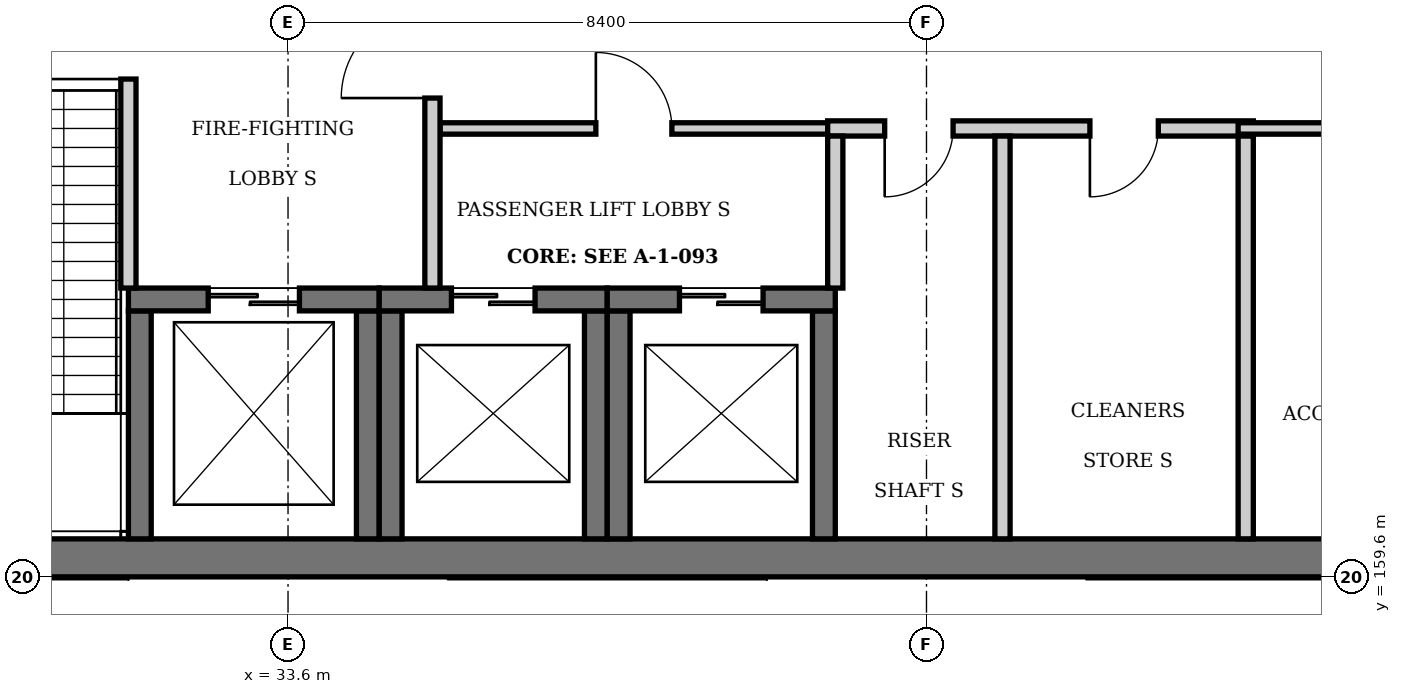
"""IFC4 building model, lengths in metres.
Left out: names, types, materials, properties, quantities, classifications, styles, units other than length and angle.
Written with IfcOpenShell. Run it as: python <this file> out.ifc"""

import sys

from ifc_helpers import new_model, si_unit, direction, frame, frame_2d, origin, place, context, subcontext, project, spatial, rectangle, extrude, element, fill, save


model = new_model("IFC4")
c1 = context("Model", 3, precision=1e-05, world=origin(), true_north=direction((0.0, 1.0)))
c2 = subcontext(c1, "Body", "Model", "MODEL_VIEW")
j1 = project(units=[si_unit("LENGTHUNIT", "METRE"), si_unit("PLANEANGLEUNIT", "RADIAN")], contexts=[c1])
p1 = place(None, origin())
s1 = spatial("IfcSite", under=j1, at=p1, CompositionType="ELEMENT")
p2 = place(p1, origin())
s2 = spatial("IfcBuilding", under=s1, at=p2, CompositionType="ELEMENT")
p3 = place(p2, frame((0.0, 0.0, 10.8)))
s3 = spatial("IfcBuildingStorey", under=s2, at=p3, CompositionType="ELEMENT", Elevation=10.8)
p4 = place(p3, frame((25.35, 159.85, 0.0), z_axis=(0.0, 0.0, 1.0), x_axis=(1.0, 0.0, 0.0)))
e1 = element("IfcWall", 1, at=p4, inside=s3, PredefinedType="SHEAR", context=c2, shape_type="SweptSolid", body=[
    extrude(rectangle(XDim=25.043, YDim=0.5, at=frame_2d((12.521, 0.0))), origin(), (0.0, 0.0, 1.0), 6.3),
])
for number, where, z_axis, x_axis in (
    (2, (34.65, 160.1, 0.0), (0.0, 0.0, 1.0), (0.0, 1.0, 0.0)),
    (3, (31.65, 160.1, 0.0), (0.0, 0.0, 1.0), (0.0, 1.0, 0.0)),
):
    element("IfcWall", number, at=place(p3, frame(where, z_axis=z_axis, x_axis=x_axis)), inside=s3, PredefinedType="SHEAR", context=c2, shape_type="SweptSolid", body=[
        extrude(rectangle(XDim=3.0, YDim=0.3, at=frame_2d((1.5, 0.0))), origin(), (0.0, 0.0, 1.0), 6.3),
    ])
p5 = place(p3, frame((31.5, 163.25, 0.0), z_axis=(0.0, 0.0, 1.0), x_axis=(1.0, 0.0, 0.0)))
e4 = element("IfcWall", 4, at=p5, inside=s3, PredefinedType="SHEAR", context=c2, shape_type="SweptSolid", body=[
    extrude(rectangle(XDim=3.3, YDim=0.3, at=frame_2d((1.65, 0.0))), origin(), (0.0, 0.0, 1.0), 6.3),
])
p6 = place(p5, frame((1.05, 0.0, 0.0)))
e5 = element("IfcOpeningElement", 5, at=p6, cuts=e4, PredefinedType="OPENING", context=c2, shape_type="SweptSolid", body=[
    extrude(rectangle(XDim=1.2, YDim=2.1, at=frame_2d((0.6, 1.05))), frame((0.0, 0.16, 0.0), z_axis=(0.0, -1.0, 0.0), x_axis=(1.0, 0.0, 0.0)), (0.0, 0.0, 1.0), 0.32),
])
for number, where, z_axis, x_axis in (
    (6, (37.65, 160.1, 0.0), (0.0, 0.0, 1.0), (0.0, 1.0, 0.0)),
    (7, (34.95, 160.1, 0.0), (0.0, 0.0, 1.0), (0.0, 1.0, 0.0)),
):
    element("IfcWall", number, at=place(p3, frame(where, z_axis=z_axis, x_axis=x_axis)), inside=s3, PredefinedType="SHEAR", context=c2, shape_type="SweptSolid", body=[
        extrude(rectangle(XDim=3.0, YDim=0.3, at=frame_2d((1.5, 0.0))), origin(), (0.0, 0.0, 1.0), 6.3),
    ])
p7 = place(p3, frame((34.8, 163.25, 0.0), z_axis=(0.0, 0.0, 1.0), x_axis=(1.0, 0.0, 0.0)))
e8 = element("IfcWall", 8, at=p7, inside=s3, PredefinedType="SHEAR", context=c2, shape_type="SweptSolid", body=[
    extrude(rectangle(XDim=3.0, YDim=0.3, at=frame_2d((1.5, 0.0))), origin(), (0.0, 0.0, 1.0), 6.3),
])
p8 = place(p7, frame((0.95, 0.0, 0.0)))
e9 = element("IfcOpeningElement", 9, at=p8, cuts=e8, PredefinedType="OPENING", context=c2, shape_type="SweptSolid", body=[
    extrude(rectangle(XDim=1.1, YDim=2.1, at=frame_2d((0.55, 1.05))), frame((0.0, 0.16, 0.0), z_axis=(0.0, -1.0, 0.0), x_axis=(1.0, 0.0, 0.0)), (0.0, 0.0, 1.0), 0.32),
])
for number, where, z_axis, x_axis in (
    (10, (40.65, 160.1, 0.0), (0.0, 0.0, 1.0), (0.0, 1.0, 0.0)),
    (11, (37.95, 160.1, 0.0), (0.0, 0.0, 1.0), (0.0, 1.0, 0.0)),
):
    element("IfcWall", number, at=place(p3, frame(where, z_axis=z_axis, x_axis=x_axis)), inside=s3, PredefinedType="SHEAR", context=c2, shape_type="SweptSolid", body=[
        extrude(rectangle(XDim=3.0, YDim=0.3, at=frame_2d((1.5, 0.0))), origin(), (0.0, 0.0, 1.0), 6.3),
    ])
p9 = place(p3, frame((37.8, 163.25, 0.0), z_axis=(0.0, 0.0, 1.0), x_axis=(1.0, 0.0, 0.0)))
e12 = element("IfcWall", 12, at=p9, inside=s3, PredefinedType="SHEAR", context=c2, shape_type="SweptSolid", body=[
    extrude(rectangle(XDim=3.0, YDim=0.3, at=frame_2d((1.5, 0.0))), origin(), (0.0, 0.0, 1.0), 6.3),
])
p10 = place(p9, frame((0.95, 0.0, 0.0)))
e13 = element("IfcOpeningElement", 13, at=p10, cuts=e12, PredefinedType="OPENING", context=c2, shape_type="SweptSolid", body=[
    extrude(rectangle(XDim=1.1, YDim=2.1, at=frame_2d((0.55, 1.05))), frame((0.0, 0.16, 0.0), z_axis=(0.0, -1.0, 0.0), x_axis=(1.0, 0.0, 0.0)), (0.0, 0.0, 1.0), 0.32),
])
p11 = place(p3, frame((35.6, 165.5, 0.0), z_axis=(0.0, 0.0, 1.0), x_axis=(1.0, 0.0, 0.0)))
e14 = element("IfcWall", 14, at=p11, inside=s3, PredefinedType="PARTITIONING", context=c2, shape_type="SweptSolid", body=[
    extrude(rectangle(XDim=5.3, YDim=0.15, at=frame_2d((2.65, 0.0))), origin(), (0.0, 0.0, 1.0), 6.05),
])
p12 = place(p11, frame((2.05, 0.0, 0.0)))
e15 = element("IfcOpeningElement", 15, at=p12, cuts=e14, PredefinedType="OPENING", context=c2, shape_type="SweptSolid", body=[
    extrude(rectangle(XDim=1.0, YDim=2.1, at=frame_2d((0.5, 1.05))), frame((0.0, 0.085, 0.0), z_axis=(0.0, -1.0, 0.0), x_axis=(1.0, 0.0, 0.0)), (0.0, 0.0, 1.0), 0.17),
])
p13 = place(p3, frame((40.7, 165.5, 0.0), z_axis=(0.0, 0.0, 1.0), x_axis=(1.0, 0.0, 0.0)))
e16 = element("IfcWall", 16, at=p13, inside=s3, PredefinedType="PARTITIONING", context=c2, shape_type="SweptSolid", body=[
    extrude(rectangle(XDim=5.6, YDim=0.2, at=frame_2d((2.8, 0.0))), origin(), (0.0, 0.0, 1.0), 6.05),
])
p14 = place(p13, frame((0.75, 0.0, 0.0)))
e17 = element("IfcOpeningElement", 17, at=p14, cuts=e16, PredefinedType="OPENING", context=c2, shape_type="SweptSolid", body=[
    extrude(rectangle(XDim=0.9, YDim=2.1, at=frame_2d((0.45, 1.05))), frame((0.0, 0.11, 0.0), z_axis=(0.0, -1.0, 0.0), x_axis=(1.0, 0.0, 0.0)), (0.0, 0.0, 1.0), 0.22),
])
p15 = place(p13, frame((3.45, 0.0, 0.0)))
e18 = element("IfcOpeningElement", 18, at=p15, cuts=e16, PredefinedType="OPENING", context=c2, shape_type="SweptSolid", body=[
    extrude(rectangle(XDim=0.9, YDim=2.1, at=frame_2d((0.45, 1.05))), frame((0.0, 0.11, 0.0), z_axis=(0.0, -1.0, 0.0), x_axis=(1.0, 0.0, 0.0)), (0.0, 0.0, 1.0), 0.22),
])
p16 = place(p3, frame((46.1, 165.5, 0.0), z_axis=(0.0, 0.0, 1.0), x_axis=(1.0, 0.0, 0.0)))
e19 = element("IfcWall", 19, at=p16, inside=s3, PredefinedType="PARTITIONING", context=c2, shape_type="SweptSolid", body=[
    extrude(rectangle(XDim=3.4, YDim=0.15, at=frame_2d((1.7, 0.0))), origin(), (0.0, 0.0, 1.0), 6.05),
])
p17 = place(p16, frame((1.25, 0.0, 0.0)))
e20 = element("IfcOpeningElement", 20, at=p17, cuts=e19, PredefinedType="OPENING", context=c2, shape_type="SweptSolid", body=[
    extrude(rectangle(XDim=1.0, YDim=2.1, at=frame_2d((0.5, 1.05))), frame((0.0, 0.085, 0.0), z_axis=(0.0, -1.0, 0.0), x_axis=(1.0, 0.0, 0.0)), (0.0, 0.0, 1.0), 0.17),
])
p18 = place(p3, frame((31.5, 163.4, 0.0), z_axis=(0.0, 0.0, 1.0), x_axis=(0.0, 1.0, 0.0)))
e21 = element("IfcWall", 21, at=p18, inside=s3, PredefinedType="PARTITIONING", context=c2, shape_type="SweptSolid", body=[
    extrude(rectangle(XDim=4.1, YDim=0.2, at=frame_2d((2.05, 0.0))), origin(), (0.0, 0.0, 1.0), 6.05),
])
p19 = place(p18, frame((2.75, 0.0, 0.0)))
e22 = element("IfcOpeningElement", 22, at=p19, cuts=e21, PredefinedType="OPENING", context=c2, shape_type="SweptSolid", body=[
    extrude(rectangle(XDim=1.1, YDim=2.4, at=frame_2d((0.55, 1.2))), frame((0.0, 0.11, 0.0), z_axis=(0.0, -1.0, 0.0), x_axis=(1.0, 0.0, 0.0)), (0.0, 0.0, 1.0), 0.22),
])
p20 = place(p3, frame((35.5, 163.4, 0.0), z_axis=(0.0, 0.0, 1.0), x_axis=(0.0, 1.0, 0.0)))
e23 = element("IfcWall", 23, at=p20, inside=s3, PredefinedType="PARTITIONING", context=c2, shape_type="SweptSolid", body=[
    extrude(rectangle(XDim=4.1, YDim=0.2, at=frame_2d((2.05, 0.0))), origin(), (0.0, 0.0, 1.0), 6.05),
])
p21 = place(p20, frame((2.5, 0.0, 0.0)))
e24 = element("IfcOpeningElement", 24, at=p21, cuts=e23, PredefinedType="OPENING", context=c2, shape_type="SweptSolid", body=[
    extrude(rectangle(XDim=1.2, YDim=2.4, at=frame_2d((0.6, 1.2))), frame((0.0, 0.11, 0.0), z_axis=(0.0, -1.0, 0.0), x_axis=(1.0, 0.0, 0.0)), (0.0, 0.0, 1.0), 0.22),
])
p22 = place(p3, frame((40.8, 163.4, 0.0), z_axis=(0.0, 0.0, 1.0), x_axis=(0.0, 1.0, 0.0)))
e25 = element("IfcWall", 25, at=p22, inside=s3, PredefinedType="PARTITIONING", context=c2, shape_type="SweptSolid", body=[
    extrude(rectangle(XDim=2.0, YDim=0.2, at=frame_2d((1.0, 0.0))), origin(), (0.0, 0.0, 1.0), 6.05),
])
for number, where, z_axis, x_axis in (
    (26, (43.0, 160.1, 0.0), (0.0, 0.0, 1.0), (0.0, 1.0, 0.0)),
    (27, (46.2, 160.1, 0.0), (0.0, 0.0, 1.0), (0.0, 1.0, 0.0)),
):
    element("IfcWall", number, at=place(p3, frame(where, z_axis=z_axis, x_axis=x_axis)), inside=s3, PredefinedType="PARTITIONING", context=c2, shape_type="SweptSolid", body=[
        extrude(rectangle(XDim=5.3, YDim=0.2, at=frame_2d((2.65, 0.0))), origin(), (0.0, 0.0, 1.0), 6.05),
    ])
p23 = place(p12, origin())
e28 = element("IfcDoor", 28, at=p23, inside=s3, OperationType="SINGLE_SWING_LEFT", PredefinedType="DOOR", context=c2, shape_type="SweptSolid", body=[
    extrude(rectangle(XDim=1.0, YDim=2.1, at=frame_2d((0.5, 1.05))), frame((0.0, 0.025, 0.0), z_axis=(0.0, -1.0, 0.0), x_axis=(1.0, 0.0, 0.0)), (0.0, 0.0, 1.0), 0.05),
])
fill(e15, e28)
p24 = place(p21, origin())
e29 = element("IfcDoor", 29, at=p24, inside=s3, OperationType="SINGLE_SWING_LEFT", PredefinedType="DOOR", context=c2, shape_type="SweptSolid", body=[
    extrude(rectangle(XDim=1.2, YDim=2.4, at=frame_2d((0.6, 1.2))), frame((0.0, 0.025, 0.0), z_axis=(0.0, -1.0, 0.0), x_axis=(1.0, 0.0, 0.0)), (0.0, 0.0, 1.0), 0.05),
])
fill(e24, e29)
p25 = place(p14, frame((0.9, 0.0, 0.0), z_axis=(0.0, 0.0, 1.0), x_axis=(-1.0, 0.0, 0.0)))
e30 = element("IfcDoor", 30, at=p25, inside=s3, OperationType="SINGLE_SWING_RIGHT", PredefinedType="DOOR", context=c2, shape_type="SweptSolid", body=[
    extrude(rectangle(XDim=0.9, YDim=2.1, at=frame_2d((0.45, 1.05))), frame((0.0, 0.025, 0.0), z_axis=(0.0, -1.0, 0.0), x_axis=(1.0, 0.0, 0.0)), (0.0, 0.0, 1.0), 0.05),
])
fill(e17, e30)
p26 = place(p15, frame((0.9, 0.0, 0.0), z_axis=(0.0, 0.0, 1.0), x_axis=(-1.0, 0.0, 0.0)))
e31 = element("IfcDoor", 31, at=p26, inside=s3, OperationType="SINGLE_SWING_RIGHT", PredefinedType="DOOR", context=c2, shape_type="SweptSolid", body=[
    extrude(rectangle(XDim=0.9, YDim=2.1, at=frame_2d((0.45, 1.05))), frame((0.0, 0.025, 0.0), z_axis=(0.0, -1.0, 0.0), x_axis=(1.0, 0.0, 0.0)), (0.0, 0.0, 1.0), 0.05),
])
fill(e18, e31)
p27 = place(p19, origin())
e32 = element("IfcDoor", 32, at=p27, inside=s3, OperationType="SINGLE_SWING_LEFT", PredefinedType="DOOR", context=c2, shape_type="SweptSolid", body=[
    extrude(rectangle(XDim=1.1, YDim=2.4, at=frame_2d((0.55, 1.2))), frame((0.0, 0.025, 0.0), z_axis=(0.0, -1.0, 0.0), x_axis=(1.0, 0.0, 0.0)), (0.0, 0.0, 1.0), 0.05),
])
fill(e22, e32)
p28 = place(p6, origin())
e33 = element("IfcDoor", 33, at=p28, inside=s3, OperationType="SLIDING_TO_LEFT", PredefinedType="DOOR", context=c2, shape_type="SweptSolid", body=[
    extrude(rectangle(XDim=1.2, YDim=2.1, at=frame_2d((0.6, 1.05))), frame((0.0, 0.025, 0.0), z_axis=(0.0, -1.0, 0.0), x_axis=(1.0, 0.0, 0.0)), (0.0, 0.0, 1.0), 0.05),
])
fill(e5, e33)
p29 = place(p8, origin())
e34 = element("IfcDoor", 34, at=p29, inside=s3, OperationType="SLIDING_TO_LEFT", PredefinedType="DOOR", context=c2, shape_type="SweptSolid", body=[
    extrude(rectangle(XDim=1.1, YDim=2.1, at=frame_2d((0.55, 1.05))), frame((0.0, 0.025, 0.0), z_axis=(0.0, -1.0, 0.0), x_axis=(1.0, 0.0, 0.0)), (0.0, 0.0, 1.0), 0.05),
])
fill(e9, e34)
p30 = place(p10, origin())
e35 = element("IfcDoor", 35, at=p30, inside=s3, OperationType="SLIDING_TO_LEFT", PredefinedType="DOOR", context=c2, shape_type="SweptSolid", body=[
    extrude(rectangle(XDim=1.1, YDim=2.1, at=frame_2d((0.55, 1.05))), frame((0.0, 0.025, 0.0), z_axis=(0.0, -1.0, 0.0), x_axis=(1.0, 0.0, 0.0)), (0.0, 0.0, 1.0), 0.05),
])
fill(e13, e35)
save(model, sys.argv[1])
